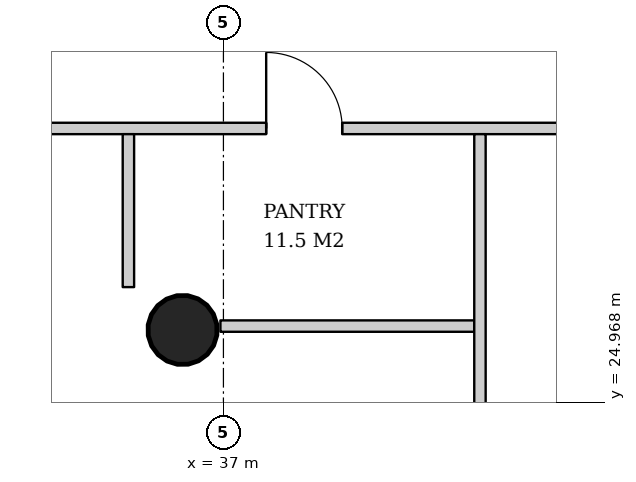
"""IFC4 building model, lengths in metres.
Left out: names, types, materials, properties, quantities, classifications, styles, units other than length and angle.
Written with IfcOpenShell. Run it as: python <this file> out.ifc"""

import sys

from ifc_helpers import new_model, si_unit, direction, frame, frame_2d, origin, origin_2d, place, context, subcontext, project, spatial, rectangle, hollow_circle, extrude, element, fill, save


model = new_model("IFC4")
c1 = context("Model", 3, precision=1e-05, world=origin(), true_north=direction((0.0, 1.0)))
c2 = subcontext(c1, "Body", "Model", "MODEL_VIEW")
j1 = project(units=[si_unit("LENGTHUNIT", "METRE"), si_unit("PLANEANGLEUNIT", "RADIAN")], contexts=[c1])
p1 = place(None, origin())
s1 = spatial("IfcSite", under=j1, at=p1, CompositionType="ELEMENT")
p2 = place(p1, origin())
s2 = spatial("IfcBuilding", under=s1, at=p2, CompositionType="ELEMENT")
p3 = place(p2, frame((0.0, 0.0, 142.6)))
s3 = spatial("IfcBuildingStorey", under=s2, at=p3, CompositionType="ELEMENT", Elevation=142.6)
p4 = place(p3, frame((36.443, 25.886, 0.0), z_axis=(0.01598826355, 0.031912317206, 0.999362786699), x_axis=(-0.894067115991, 0.447933021895, 0.0)))
e1 = element("IfcColumn", 1, at=p4, inside=s3, PredefinedType="COLUMN", context=c2, shape_type="SweptSolid", body=[
    extrude(hollow_circle(Radius=0.457, WallThickness=0.03, at=origin_2d()), origin(), (0.0, 0.0, 1.0), 3.802),
])
p5 = place(p3, frame((36.96, 25.975, 0.0), z_axis=(0.0, 0.0, 1.0), x_axis=(1.0, 0.0, 0.0)))
e2 = element("IfcWall", 2, at=p5, inside=s3, PredefinedType="PARTITIONING", context=c2, shape_type="SweptSolid", body=[
    extrude(rectangle(XDim=3.34, YDim=0.15, at=frame_2d((1.67, 0.0))), origin(), (0.0, 0.0, 1.0), 2.82),
])
p6 = place(p3, frame((29.489, 28.575, 0.0), z_axis=(0.0, 0.0, 1.0), x_axis=(1.0, 0.0, 0.0)))
e3 = element("IfcWall", 3, at=p6, inside=s3, PredefinedType="PARTITIONING", context=c2, shape_type="SweptSolid", body=[
    extrude(rectangle(XDim=31.023, YDim=0.15, at=frame_2d((15.511, 0.0))), origin(), (0.0, 0.0, 1.0), 2.72),
])
p7 = place(p6, frame((3.449, 0.0, 0.0)))
e4 = element("IfcOpeningElement", 4, at=p7, cuts=e3, PredefinedType="OPENING", context=c2, shape_type="SweptSolid", body=[
    extrude(rectangle(XDim=1.0, YDim=2.1, at=frame_2d((0.5, 1.05))), frame((0.0, 0.085, 0.0), z_axis=(0.0, -1.0, 0.0), x_axis=(1.0, 0.0, 0.0)), (0.0, 0.0, 1.0), 0.17),
])
p8 = place(p6, frame((8.074, 0.0, 0.0)))
e5 = element("IfcOpeningElement", 5, at=p8, cuts=e3, PredefinedType="OPENING", context=c2, shape_type="SweptSolid", body=[
    extrude(rectangle(XDim=1.0, YDim=2.1, at=frame_2d((0.5, 1.05))), frame((0.0, 0.085, 0.0), z_axis=(0.0, -1.0, 0.0), x_axis=(1.0, 0.0, 0.0)), (0.0, 0.0, 1.0), 0.17),
])
p9 = place(p6, frame((12.699, 0.0, 0.0)))
e6 = element("IfcOpeningElement", 6, at=p9, cuts=e3, PredefinedType="OPENING", context=c2, shape_type="SweptSolid", body=[
    extrude(rectangle(XDim=1.0, YDim=2.1, at=frame_2d((0.5, 1.05))), frame((0.0, 0.085, 0.0), z_axis=(0.0, -1.0, 0.0), x_axis=(1.0, 0.0, 0.0)), (0.0, 0.0, 1.0), 0.17),
])
p10 = place(p6, frame((17.324, 0.0, 0.0)))
e7 = element("IfcOpeningElement", 7, at=p10, cuts=e3, PredefinedType="OPENING", context=c2, shape_type="SweptSolid", body=[
    extrude(rectangle(XDim=1.0, YDim=2.1, at=frame_2d((0.5, 1.05))), frame((0.0, 0.085, 0.0), z_axis=(0.0, -1.0, 0.0), x_axis=(1.0, 0.0, 0.0)), (0.0, 0.0, 1.0), 0.17),
])
p11 = place(p6, frame((21.949, 0.0, 0.0)))
e8 = element("IfcOpeningElement", 8, at=p11, cuts=e3, PredefinedType="OPENING", context=c2, shape_type="SweptSolid", body=[
    extrude(rectangle(XDim=1.0, YDim=2.1, at=frame_2d((0.5, 1.05))), frame((0.0, 0.085, 0.0), z_axis=(0.0, -1.0, 0.0), x_axis=(1.0, 0.0, 0.0)), (0.0, 0.0, 1.0), 0.17),
])
p12 = place(p6, frame((26.574, 0.0, 0.0)))
e9 = element("IfcOpeningElement", 9, at=p12, cuts=e3, PredefinedType="OPENING", context=c2, shape_type="SweptSolid", body=[
    extrude(rectangle(XDim=1.0, YDim=2.1, at=frame_2d((0.5, 1.05))), frame((0.0, 0.085, 0.0), z_axis=(0.0, -1.0, 0.0), x_axis=(1.0, 0.0, 0.0)), (0.0, 0.0, 1.0), 0.17),
])
p13 = place(p3, frame((35.75, 28.5, 0.0), z_axis=(0.0, 0.0, 1.0), x_axis=(0.0, -1.0, 0.0)))
e10 = element("IfcWall", 10, at=p13, inside=s3, PredefinedType="PARTITIONING", context=c2, shape_type="SweptSolid", body=[
    extrude(rectangle(XDim=2.012, YDim=0.15, at=frame_2d((1.006, 0.0))), origin(), (0.0, 0.0, 1.0), 3.62),
])
p14 = place(p3, frame((40.375, 28.5, 0.0), z_axis=(0.0, 0.0, 1.0), x_axis=(0.0, -1.0, 0.0)))
e11 = element("IfcWall", 11, at=p14, inside=s3, PredefinedType="PARTITIONING", context=c2, shape_type="SweptSolid", body=[
    extrude(rectangle(XDim=4.04, YDim=0.15, at=frame_2d((2.02, 0.0))), origin(), (0.0, 0.0, 1.0), 2.82),
])
p15 = place(p8, origin())
e12 = element("IfcDoor", 12, at=p15, inside=s3, OperationType="SINGLE_SWING_LEFT", PredefinedType="DOOR", context=c2, shape_type="SweptSolid", body=[
    extrude(rectangle(XDim=1.0, YDim=2.1, at=frame_2d((0.5, 1.05))), frame((0.0, 0.025, 0.0), z_axis=(0.0, -1.0, 0.0), x_axis=(1.0, 0.0, 0.0)), (0.0, 0.0, 1.0), 0.05),
])
fill(e5, e12)
save(model, sys.argv[1])
